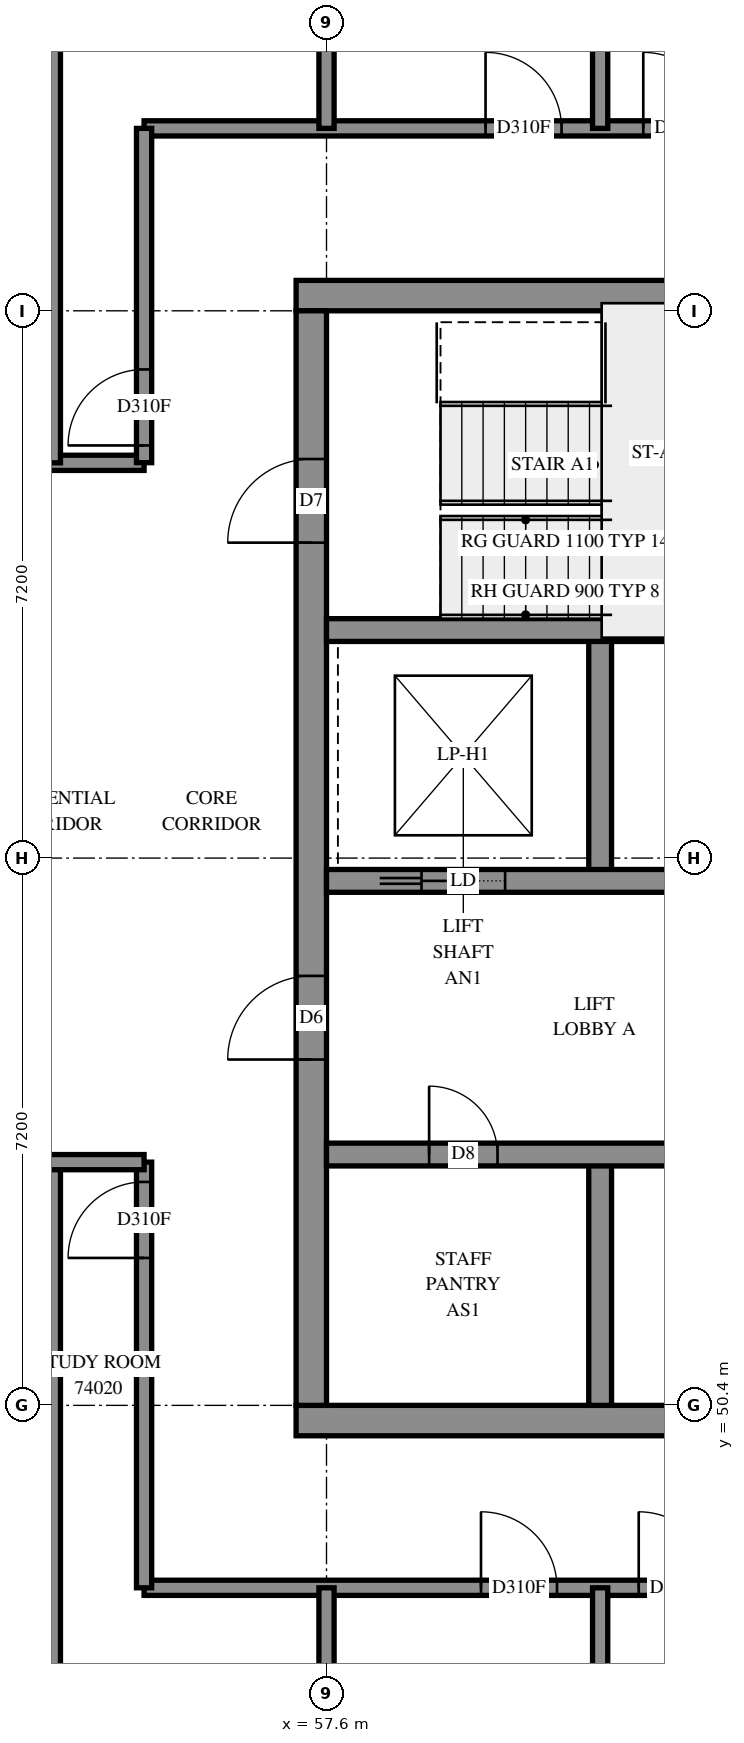
"""IFC4 building model, lengths in metres.
Left out: names, types, materials, properties, quantities, classifications, styles, units other than length and angle.
Written with IfcOpenShell. Run it as: python <this file> out.ifc"""

import sys

from ifc_helpers import new_model, si_unit, direction, frame, frame_2d, origin, place, context, subcontext, project, spatial, rectangle, extrude, element, fill, save


model = new_model("IFC4")
c1 = context("Model", 3, precision=1e-05, world=origin(), true_north=direction((0.0, 1.0)))
c2 = subcontext(c1, "Body", "Model", "MODEL_VIEW")
j1 = project(units=[si_unit("LENGTHUNIT", "METRE"), si_unit("PLANEANGLEUNIT", "RADIAN")], contexts=[c1])
p1 = place(None, origin())
s1 = spatial("IfcSite", under=j1, at=p1, CompositionType="ELEMENT")
p2 = place(p1, origin())
s2 = spatial("IfcBuilding", under=s1, at=p2, CompositionType="ELEMENT")
p3 = place(p2, frame((0.0, 0.0, 271.0)))
s3 = spatial("IfcBuildingStorey", under=s2, at=p3, CompositionType="ELEMENT", Elevation=271.0)
p4 = place(p3, frame((57.2, 50.2, -0.3), z_axis=(0.0, 0.0, 1.0), x_axis=(1.0, 0.0, 0.0)))
e1 = element("IfcWall", 1, at=p4, inside=s3, PredefinedType="SHEAR", context=c2, shape_type="SweptSolid", body=[
    extrude(rectangle(XDim=15.2, YDim=0.4, at=frame_2d((7.6, 0.0))), origin(), (0.0, 0.0, 1.0), 2.7),
])
p5 = place(p3, frame((57.2, 65.0, -0.3), z_axis=(0.0, 0.0, 1.0), x_axis=(1.0, 0.0, 0.0)))
e2 = element("IfcWall", 2, at=p5, inside=s3, PredefinedType="SHEAR", context=c2, shape_type="SweptSolid", body=[
    extrude(rectangle(XDim=15.2, YDim=0.4, at=frame_2d((7.6, 0.0))), origin(), (0.0, 0.0, 1.0), 2.7),
])
p6 = place(p5, frame((10.4, 0.0, 0.3)))
e3 = element("IfcOpeningElement", 3, at=p6, cuts=e2, PredefinedType="OPENING", context=c2, shape_type="SweptSolid", body=[
    extrude(rectangle(XDim=0.8, YDim=2.1, at=frame_2d((0.4, 1.05))), frame((0.0, 0.21, 0.0), z_axis=(0.0, -1.0, 0.0), x_axis=(1.0, 0.0, 0.0)), (0.0, 0.0, 1.0), 0.42),
])
p7 = place(p3, frame((57.4, 50.4, -0.3), z_axis=(0.0, 0.0, 1.0), x_axis=(0.0, 1.0, 0.0)))
e4 = element("IfcWall", 4, at=p7, inside=s3, PredefinedType="SHEAR", context=c2, shape_type="SweptSolid", body=[
    extrude(rectangle(XDim=14.4, YDim=0.4, at=frame_2d((7.2, 0.0))), origin(), (0.0, 0.0, 1.0), 2.7),
])
p8 = place(p7, frame((4.55, 0.0, 0.3)))
e5 = element("IfcOpeningElement", 5, at=p8, cuts=e4, PredefinedType="OPENING", context=c2, shape_type="SweptSolid", body=[
    extrude(rectangle(XDim=1.1, YDim=2.1, at=frame_2d((0.55, 1.05))), frame((0.0, 0.21, 0.0), z_axis=(0.0, -1.0, 0.0), x_axis=(1.0, 0.0, 0.0)), (0.0, 0.0, 1.0), 0.42),
])
p9 = place(p7, frame((11.35, 0.0, 0.3)))
e6 = element("IfcOpeningElement", 6, at=p9, cuts=e4, PredefinedType="OPENING", context=c2, shape_type="SweptSolid", body=[
    extrude(rectangle(XDim=1.1, YDim=2.1, at=frame_2d((0.55, 1.05))), frame((0.0, 0.21, 0.0), z_axis=(0.0, -1.0, 0.0), x_axis=(1.0, 0.0, 0.0)), (0.0, 0.0, 1.0), 0.42),
])
for number, where, z_axis, x_axis in (
    (7, (61.2, 50.4, 0.0), (0.0, 0.0, 1.0), (0.0, 1.0, 0.0)),
    (8, (61.2, 57.3, 0.0), (0.0, 0.0, 1.0), (0.0, 1.0, 0.0)),
):
    element("IfcWall", number, at=place(p3, frame(where, z_axis=z_axis, x_axis=x_axis)), inside=s3, PredefinedType="SOLIDWALL", context=c2, shape_type="SweptSolid", body=[
        extrude(rectangle(XDim=3.3, YDim=0.3, at=frame_2d((1.65, 0.0))), origin(), (0.0, 0.0, 1.0), 3.1),
    ])
p10 = place(p3, frame((57.6, 53.7, 0.0), z_axis=(0.0, 0.0, 1.0), x_axis=(1.0, 0.0, 0.0)))
e9 = element("IfcWall", 9, at=p10, inside=s3, PredefinedType="SOLIDWALL", context=c2, shape_type="SweptSolid", body=[
    extrude(rectangle(XDim=14.4, YDim=0.3, at=frame_2d((7.2, 0.0))), origin(), (0.0, 0.0, 1.0), 3.1),
])
p11 = place(p10, frame((1.35, 0.0, 0.0)))
e10 = element("IfcOpeningElement", 10, at=p11, cuts=e9, PredefinedType="OPENING", context=c2, shape_type="SweptSolid", body=[
    extrude(rectangle(XDim=0.9, YDim=2.1, at=frame_2d((0.45, 1.05))), frame((0.0, 0.16, 0.0), z_axis=(0.0, -1.0, 0.0), x_axis=(1.0, 0.0, 0.0)), (0.0, 0.0, 1.0), 0.32),
])
p12 = place(p10, frame((4.95, 0.0, 0.0)))
e11 = element("IfcOpeningElement", 11, at=p12, cuts=e9, PredefinedType="OPENING", context=c2, shape_type="SweptSolid", body=[
    extrude(rectangle(XDim=0.9, YDim=2.1, at=frame_2d((0.45, 1.05))), frame((0.0, 0.16, 0.0), z_axis=(0.0, -1.0, 0.0), x_axis=(1.0, 0.0, 0.0)), (0.0, 0.0, 1.0), 0.32),
])
p13 = place(p10, frame((8.55, 0.0, 0.0)))
e12 = element("IfcOpeningElement", 12, at=p13, cuts=e9, PredefinedType="OPENING", context=c2, shape_type="SweptSolid", body=[
    extrude(rectangle(XDim=0.9, YDim=2.1, at=frame_2d((0.45, 1.05))), frame((0.0, 0.16, 0.0), z_axis=(0.0, -1.0, 0.0), x_axis=(1.0, 0.0, 0.0)), (0.0, 0.0, 1.0), 0.32),
])
p14 = place(p10, frame((12.05, 0.0, 0.0)))
e13 = element("IfcOpeningElement", 13, at=p14, cuts=e9, PredefinedType="OPENING", context=c2, shape_type="SweptSolid", body=[
    extrude(rectangle(XDim=1.1, YDim=2.1, at=frame_2d((0.55, 1.05))), frame((0.0, 0.16, 0.0), z_axis=(0.0, -1.0, 0.0), x_axis=(1.0, 0.0, 0.0)), (0.0, 0.0, 1.0), 0.32),
])
p15 = place(p3, frame((57.6, 57.3, 0.0), z_axis=(0.0, 0.0, 1.0), x_axis=(1.0, 0.0, 0.0)))
e14 = element("IfcWall", 14, at=p15, inside=s3, PredefinedType="SOLIDWALL", context=c2, shape_type="SweptSolid", body=[
    extrude(rectangle(XDim=14.4, YDim=0.3, at=frame_2d((7.2, 0.0))), origin(), (0.0, 0.0, 1.0), 3.1),
])
p16 = place(p15, frame((8.55, 0.0, 0.0)))
e15 = element("IfcOpeningElement", 15, at=p16, cuts=e14, PredefinedType="OPENING", context=c2, shape_type="SweptSolid", body=[
    extrude(rectangle(XDim=0.9, YDim=2.1, at=frame_2d((0.45, 1.05))), frame((0.0, 0.16, 0.0), z_axis=(0.0, -1.0, 0.0), x_axis=(1.0, 0.0, 0.0)), (0.0, 0.0, 1.0), 0.32),
])
p17 = place(p15, frame((1.25, 0.0, 0.0)))
e16 = element("IfcOpeningElement", 16, at=p17, cuts=e14, PredefinedType="OPENING", context=c2, shape_type="SweptSolid", body=[
    extrude(rectangle(XDim=1.1, YDim=2.1, at=frame_2d((0.55, 1.05))), frame((0.0, 0.16, 0.0), z_axis=(0.0, -1.0, 0.0), x_axis=(1.0, 0.0, 0.0)), (0.0, 0.0, 1.0), 0.32),
])
p18 = place(p15, frame((4.85, 0.0, 0.0)))
e17 = element("IfcOpeningElement", 17, at=p18, cuts=e14, PredefinedType="OPENING", context=c2, shape_type="SweptSolid", body=[
    extrude(rectangle(XDim=1.1, YDim=2.1, at=frame_2d((0.55, 1.05))), frame((0.0, 0.16, 0.0), z_axis=(0.0, -1.0, 0.0), x_axis=(1.0, 0.0, 0.0)), (0.0, 0.0, 1.0), 0.32),
])
p19 = place(p15, frame((12.05, 0.0, 0.0)))
e18 = element("IfcOpeningElement", 18, at=p19, cuts=e14, PredefinedType="OPENING", context=c2, shape_type="SweptSolid", body=[
    extrude(rectangle(XDim=1.1, YDim=2.1, at=frame_2d((0.55, 1.05))), frame((0.0, 0.16, 0.0), z_axis=(0.0, -1.0, 0.0), x_axis=(1.0, 0.0, 0.0)), (0.0, 0.0, 1.0), 0.32),
])
p20 = place(p3, frame((57.6, 60.6, 0.0), z_axis=(0.0, 0.0, 1.0), x_axis=(1.0, 0.0, 0.0)))
e19 = element("IfcWall", 19, at=p20, inside=s3, PredefinedType="SOLIDWALL", context=c2, shape_type="SweptSolid", body=[
    extrude(rectangle(XDim=7.2, YDim=0.3, at=frame_2d((3.6, 0.0))), origin(), (0.0, 0.0, 1.0), 3.1),
])
p21 = place(p3, frame((55.2, 67.2, 0.0), z_axis=(0.0, 0.0, 1.0), x_axis=(1.0, 0.0, 0.0)))
e20 = element("IfcWall", 20, at=p21, inside=s3, PredefinedType="PARTITIONING", context=c2, shape_type="SweptSolid", body=[
    extrude(rectangle(XDim=19.2, YDim=0.2, at=frame_2d((9.6, 0.0))), origin(), (0.0, 0.0, 1.0), 3.1),
])
p22 = place(p21, frame((4.492, 0.0, 0.0)))
e21 = element("IfcOpeningElement", 21, at=p22, cuts=e20, PredefinedType="OPENING", context=c2, shape_type="SweptSolid", body=[
    extrude(rectangle(XDim=1.0, YDim=2.1, at=frame_2d((0.5, 1.05))), frame((0.0, 0.11, 0.0), z_axis=(0.0, -1.0, 0.0), x_axis=(1.0, 0.0, 0.0)), (0.0, 0.0, 1.0), 0.22),
])
p23 = place(p21, frame((6.567, 0.0, 0.0)))
e22 = element("IfcOpeningElement", 22, at=p23, cuts=e20, PredefinedType="OPENING", context=c2, shape_type="SweptSolid", body=[
    extrude(rectangle(XDim=1.0, YDim=2.1, at=frame_2d((0.5, 1.05))), frame((0.0, 0.11, 0.0), z_axis=(0.0, -1.0, 0.0), x_axis=(1.0, 0.0, 0.0)), (0.0, 0.0, 1.0), 0.22),
])
p24 = place(p21, frame((11.693, 0.0, 0.0)))
e23 = element("IfcOpeningElement", 23, at=p24, cuts=e20, PredefinedType="OPENING", context=c2, shape_type="SweptSolid", body=[
    extrude(rectangle(XDim=1.0, YDim=2.1, at=frame_2d((0.5, 1.05))), frame((0.0, 0.11, 0.0), z_axis=(0.0, -1.0, 0.0), x_axis=(1.0, 0.0, 0.0)), (0.0, 0.0, 1.0), 0.22),
])
p25 = place(p21, frame((13.88, 0.0, 0.0)))
e24 = element("IfcOpeningElement", 24, at=p25, cuts=e20, PredefinedType="OPENING", context=c2, shape_type="SweptSolid", body=[
    extrude(rectangle(XDim=1.0, YDim=2.1, at=frame_2d((0.5, 1.05))), frame((0.0, 0.11, 0.0), z_axis=(0.0, -1.0, 0.0), x_axis=(1.0, 0.0, 0.0)), (0.0, 0.0, 1.0), 0.22),
])
p26 = place(p3, frame((55.2, 48.0, 0.0), z_axis=(0.0, 0.0, 1.0), x_axis=(1.0, 0.0, 0.0)))
e25 = element("IfcWall", 25, at=p26, inside=s3, PredefinedType="PARTITIONING", context=c2, shape_type="SweptSolid", body=[
    extrude(rectangle(XDim=19.15, YDim=0.2, at=frame_2d((9.575, 0.0))), origin(), (0.0, 0.0, 1.0), 3.1),
])
p27 = place(p26, frame((4.433, 0.0, 0.0)))
e26 = element("IfcOpeningElement", 26, at=p27, cuts=e25, PredefinedType="OPENING", context=c2, shape_type="SweptSolid", body=[
    extrude(rectangle(XDim=1.0, YDim=2.1, at=frame_2d((0.5, 1.05))), frame((0.0, 0.11, 0.0), z_axis=(0.0, -1.0, 0.0), x_axis=(1.0, 0.0, 0.0)), (0.0, 0.0, 1.0), 0.22),
])
p28 = place(p26, frame((6.508, 0.0, 0.0)))
e27 = element("IfcOpeningElement", 27, at=p28, cuts=e25, PredefinedType="OPENING", context=c2, shape_type="SweptSolid", body=[
    extrude(rectangle(XDim=1.0, YDim=2.1, at=frame_2d((0.5, 1.05))), frame((0.0, 0.11, 0.0), z_axis=(0.0, -1.0, 0.0), x_axis=(1.0, 0.0, 0.0)), (0.0, 0.0, 1.0), 0.22),
])
p29 = place(p26, frame((13.499, 0.0, 0.0)))
e28 = element("IfcOpeningElement", 28, at=p29, cuts=e25, PredefinedType="OPENING", context=c2, shape_type="SweptSolid", body=[
    extrude(rectangle(XDim=0.9, YDim=2.1, at=frame_2d((0.45, 1.05))), frame((0.0, 0.11, 0.0), z_axis=(0.0, -1.0, 0.0), x_axis=(1.0, 0.0, 0.0)), (0.0, 0.0, 1.0), 0.22),
])
p30 = place(p3, frame((40.602, 62.8, 0.0), z_axis=(0.0, 0.0, 1.0), x_axis=(1.0, 0.0, 0.0)))
e29 = element("IfcWall", 29, at=p30, inside=s3, PredefinedType="PARTITIONING", context=c2, shape_type="SweptSolid", body=[
    extrude(rectangle(XDim=14.598, YDim=0.2, at=frame_2d((7.299, 0.0))), origin(), (0.0, 0.0, 1.0), 3.1),
])
p31 = place(p30, frame((0.124, 0.0, 0.0)))
e30 = element("IfcOpeningElement", 30, at=p31, cuts=e29, PredefinedType="OPENING", context=c2, shape_type="SweptSolid", body=[
    extrude(rectangle(XDim=1.0, YDim=2.1, at=frame_2d((0.5, 1.05))), frame((0.0, 0.11, 0.0), z_axis=(0.0, -1.0, 0.0), x_axis=(1.0, 0.0, 0.0)), (0.0, 0.0, 1.0), 0.22),
])
p32 = place(p30, frame((4.691, 0.0, 0.0)))
e31 = element("IfcOpeningElement", 31, at=p32, cuts=e29, PredefinedType="OPENING", context=c2, shape_type="SweptSolid", body=[
    extrude(rectangle(XDim=1.0, YDim=2.1, at=frame_2d((0.5, 1.05))), frame((0.0, 0.11, 0.0), z_axis=(0.0, -1.0, 0.0), x_axis=(1.0, 0.0, 0.0)), (0.0, 0.0, 1.0), 0.22),
])
p33 = place(p30, frame((6.766, 0.0, 0.0)))
e32 = element("IfcOpeningElement", 32, at=p33, cuts=e29, PredefinedType="OPENING", context=c2, shape_type="SweptSolid", body=[
    extrude(rectangle(XDim=1.0, YDim=2.1, at=frame_2d((0.5, 1.05))), frame((0.0, 0.11, 0.0), z_axis=(0.0, -1.0, 0.0), x_axis=(1.0, 0.0, 0.0)), (0.0, 0.0, 1.0), 0.22),
])
p34 = place(p30, frame((11.89, 0.0, 0.0)))
e33 = element("IfcOpeningElement", 33, at=p34, cuts=e29, PredefinedType="OPENING", context=c2, shape_type="SweptSolid", body=[
    extrude(rectangle(XDim=1.0, YDim=2.1, at=frame_2d((0.5, 1.05))), frame((0.0, 0.11, 0.0), z_axis=(0.0, -1.0, 0.0), x_axis=(1.0, 0.0, 0.0)), (0.0, 0.0, 1.0), 0.22),
])
p35 = place(p3, frame((54.0, 42.277, 0.0), z_axis=(0.0, 0.0, 1.0), x_axis=(0.0, 1.0, 0.0)))
e34 = element("IfcWall", 34, at=p35, inside=s3, PredefinedType="PARTITIONING", context=c2, shape_type="SweptSolid", body=[
    extrude(rectangle(XDim=11.323, YDim=0.2, at=frame_2d((5.662, 0.0))), origin(), (0.0, 0.0, 1.0), 3.1),
])
p36 = place(p3, frame((54.0, 62.8, 0.0), z_axis=(0.0, 0.0, 1.0), x_axis=(0.0, 1.0, 0.0)))
e35 = element("IfcWall", 35, at=p36, inside=s3, PredefinedType="PARTITIONING", context=c2, shape_type="SweptSolid", body=[
    extrude(rectangle(XDim=10.042, YDim=0.2, at=frame_2d((5.021, 0.0))), origin(), (0.0, 0.0, 1.0), 3.1),
])
p37 = place(p3, frame((61.2, 42.281, 0.0), z_axis=(0.0, 0.0, 1.0), x_axis=(0.0, 1.0, 0.0)))
e36 = element("IfcWall", 36, at=p37, inside=s3, PredefinedType="PARTITIONING", context=c2, shape_type="SweptSolid", body=[
    extrude(rectangle(XDim=5.72, YDim=0.2, at=frame_2d((2.86, 0.0))), origin(), (0.0, 0.0, 1.0), 3.1),
])
p38 = place(p3, frame((55.2, 48.0, 0.0), z_axis=(0.0, 0.0, 1.0), x_axis=(0.0, 1.0, 0.0)))
e37 = element("IfcWall", 37, at=p38, inside=s3, PredefinedType="PARTITIONING", context=c2, shape_type="SweptSolid", body=[
    extrude(rectangle(XDim=5.6, YDim=0.2, at=frame_2d((2.8, 0.0))), origin(), (0.0, 0.0, 1.0), 3.1),
])
p39 = place(p38, frame((4.34, 0.0, 0.0)))
e38 = element("IfcOpeningElement", 38, at=p39, cuts=e37, PredefinedType="OPENING", context=c2, shape_type="SweptSolid", body=[
    extrude(rectangle(XDim=1.0, YDim=2.1, at=frame_2d((0.5, 1.05))), frame((0.0, 0.11, 0.0), z_axis=(0.0, -1.0, 0.0), x_axis=(1.0, 0.0, 0.0)), (0.0, 0.0, 1.0), 0.22),
])
p40 = place(p3, frame((61.2, 67.2, 0.0), z_axis=(0.0, 0.0, 1.0), x_axis=(0.0, 1.0, 0.0)))
e39 = element("IfcWall", 39, at=p40, inside=s3, PredefinedType="PARTITIONING", context=c2, shape_type="SweptSolid", body=[
    extrude(rectangle(XDim=5.576, YDim=0.2, at=frame_2d((2.788, 0.0))), origin(), (0.0, 0.0, 1.0), 3.1),
])
p41 = place(p3, frame((50.4, 53.6, 0.0), z_axis=(0.0, 0.0, 1.0), x_axis=(1.0, 0.0, 0.0)))
e40 = element("IfcWall", 40, at=p41, inside=s3, PredefinedType="PARTITIONING", context=c2, shape_type="SweptSolid", body=[
    extrude(rectangle(XDim=4.8, YDim=0.2, at=frame_2d((2.4, 0.0))), origin(), (0.0, 0.0, 1.0), 3.1),
])
p42 = place(p41, frame((2.033, 0.0, 0.0)))
e41 = element("IfcOpeningElement", 41, at=p42, cuts=e40, PredefinedType="OPENING", context=c2, shape_type="SweptSolid", body=[
    extrude(rectangle(XDim=1.0, YDim=2.1, at=frame_2d((0.5, 1.05))), frame((0.0, 0.11, 0.0), z_axis=(0.0, -1.0, 0.0), x_axis=(1.0, 0.0, 0.0)), (0.0, 0.0, 1.0), 0.22),
])
for number, where, z_axis, x_axis in (
    (42, (57.6, 43.55, 0.0), (0.0, 0.0, 1.0), (0.0, 1.0, 0.0)),
    (43, (57.6, 67.2, 0.0), (0.0, 0.0, 1.0), (0.0, 1.0, 0.0)),
):
    element("IfcWall", number, at=place(p3, frame(where, z_axis=z_axis, x_axis=x_axis)), inside=s3, PredefinedType="PARTITIONING", context=c2, shape_type="SweptSolid", body=[
        extrude(rectangle(XDim=4.45, YDim=0.2, at=frame_2d((2.225, 0.0))), origin(), (0.0, 0.0, 1.0), 3.1),
    ])
p43 = place(p3, frame((55.2, 62.802, 0.0), z_axis=(0.0, 0.0, 1.0), x_axis=(0.0, 1.0, 0.0)))
e44 = element("IfcWall", 44, at=p43, inside=s3, PredefinedType="PARTITIONING", context=c2, shape_type="SweptSolid", body=[
    extrude(rectangle(XDim=4.398, YDim=0.2, at=frame_2d((2.199, 0.0))), origin(), (0.0, 0.0, 1.0), 3.1),
])
p44 = place(p43, frame((0.227, 0.0, 0.0)))
e45 = element("IfcOpeningElement", 45, at=p44, cuts=e44, PredefinedType="OPENING", context=c2, shape_type="SweptSolid", body=[
    extrude(rectangle(XDim=1.0, YDim=2.1, at=frame_2d((0.5, 1.05))), frame((0.0, 0.11, 0.0), z_axis=(0.0, -1.0, 0.0), x_axis=(1.0, 0.0, 0.0)), (0.0, 0.0, 1.0), 0.22),
])
p45 = place(p8, origin())
e46 = element("IfcDoor", 46, at=p45, inside=s3, OperationType="DOUBLE_DOOR_SINGLE_SWING", PredefinedType="DOOR", context=c2, shape_type="SweptSolid", body=[
    extrude(rectangle(XDim=1.1, YDim=2.1, at=frame_2d((0.55, 1.05))), frame((0.0, 0.025, 0.0), z_axis=(0.0, -1.0, 0.0), x_axis=(1.0, 0.0, 0.0)), (0.0, 0.0, 1.0), 0.05),
])
fill(e5, e46)
p46 = place(p9, origin())
e47 = element("IfcDoor", 47, at=p46, inside=s3, OperationType="SINGLE_SWING_LEFT", PredefinedType="DOOR", context=c2, shape_type="SweptSolid", body=[
    extrude(rectangle(XDim=1.1, YDim=2.1, at=frame_2d((0.55, 1.05))), frame((0.0, 0.025, 0.0), z_axis=(0.0, -1.0, 0.0), x_axis=(1.0, 0.0, 0.0)), (0.0, 0.0, 1.0), 0.05),
])
fill(e6, e47)
p47 = place(p11, origin())
e48 = element("IfcDoor", 48, at=p47, inside=s3, OperationType="SINGLE_SWING_LEFT", PredefinedType="DOOR", context=c2, shape_type="SweptSolid", body=[
    extrude(rectangle(XDim=0.9, YDim=2.1, at=frame_2d((0.45, 1.05))), frame((0.0, 0.025, 0.0), z_axis=(0.0, -1.0, 0.0), x_axis=(1.0, 0.0, 0.0)), (0.0, 0.0, 1.0), 0.05),
])
fill(e10, e48)
p48 = place(p17, origin())
e49 = element("IfcDoor", 49, at=p48, inside=s3, OperationType="SLIDING_TO_LEFT", PredefinedType="DOOR", context=c2, shape_type="SweptSolid", body=[
    extrude(rectangle(XDim=1.1, YDim=2.1, at=frame_2d((0.55, 1.05))), frame((0.0, 0.025, 0.0), z_axis=(0.0, -1.0, 0.0), x_axis=(1.0, 0.0, 0.0)), (0.0, 0.0, 1.0), 0.05),
])
fill(e16, e49)
p49 = place(p39, origin())
e50 = element("IfcDoor", 50, at=p49, inside=s3, OperationType="SINGLE_SWING_RIGHT", PredefinedType="DOOR", context=c2, shape_type="SweptSolid", body=[
    extrude(rectangle(XDim=1.0, YDim=2.1, at=frame_2d((0.5, 1.05))), frame((0.0, 0.025, 0.0), z_axis=(0.0, -1.0, 0.0), x_axis=(1.0, 0.0, 0.0)), (0.0, 0.0, 1.0), 0.05),
])
fill(e38, e50)
p50 = place(p27, origin())
e51 = element("IfcDoor", 51, at=p50, inside=s3, OperationType="SINGLE_SWING_LEFT", PredefinedType="DOOR", context=c2, shape_type="SweptSolid", body=[
    extrude(rectangle(XDim=1.0, YDim=2.1, at=frame_2d((0.5, 1.05))), frame((0.0, 0.025, 0.0), z_axis=(0.0, -1.0, 0.0), x_axis=(1.0, 0.0, 0.0)), (0.0, 0.0, 1.0), 0.05),
])
fill(e26, e51)
p51 = place(p28, origin())
e52 = element("IfcDoor", 52, at=p51, inside=s3, OperationType="SINGLE_SWING_RIGHT", PredefinedType="DOOR", context=c2, shape_type="SweptSolid", body=[
    extrude(rectangle(XDim=1.0, YDim=2.1, at=frame_2d((0.5, 1.05))), frame((0.0, 0.025, 0.0), z_axis=(0.0, -1.0, 0.0), x_axis=(1.0, 0.0, 0.0)), (0.0, 0.0, 1.0), 0.05),
])
fill(e27, e52)
p52 = place(p44, origin())
e53 = element("IfcDoor", 53, at=p52, inside=s3, OperationType="SINGLE_SWING_LEFT", PredefinedType="DOOR", context=c2, shape_type="SweptSolid", body=[
    extrude(rectangle(XDim=1.0, YDim=2.1, at=frame_2d((0.5, 1.05))), frame((0.0, 0.025, 0.0), z_axis=(0.0, -1.0, 0.0), x_axis=(1.0, 0.0, 0.0)), (0.0, 0.0, 1.0), 0.05),
])
fill(e45, e53)
p53 = place(p22, origin())
e54 = element("IfcDoor", 54, at=p53, inside=s3, OperationType="SINGLE_SWING_RIGHT", PredefinedType="DOOR", context=c2, shape_type="SweptSolid", body=[
    extrude(rectangle(XDim=1.0, YDim=2.1, at=frame_2d((0.5, 1.05))), frame((0.0, 0.025, 0.0), z_axis=(0.0, -1.0, 0.0), x_axis=(1.0, 0.0, 0.0)), (0.0, 0.0, 1.0), 0.05),
])
fill(e21, e54)
p54 = place(p23, origin())
e55 = element("IfcDoor", 55, at=p54, inside=s3, OperationType="SINGLE_SWING_LEFT", PredefinedType="DOOR", context=c2, shape_type="SweptSolid", body=[
    extrude(rectangle(XDim=1.0, YDim=2.1, at=frame_2d((0.5, 1.05))), frame((0.0, 0.025, 0.0), z_axis=(0.0, -1.0, 0.0), x_axis=(1.0, 0.0, 0.0)), (0.0, 0.0, 1.0), 0.05),
])
fill(e22, e55)
save(model, sys.argv[1])
